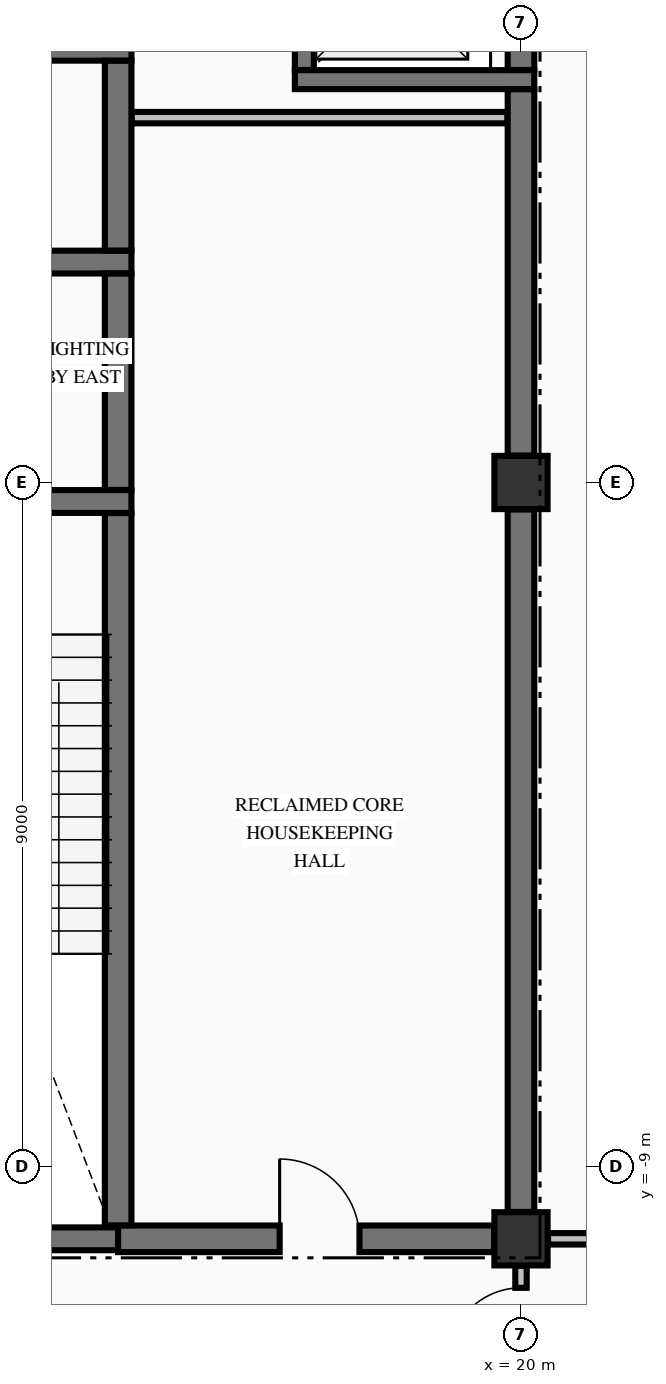
"""IFC4 building model, lengths in metres.
Left out: names, types, materials, properties, quantities, classifications, styles, units other than length and angle.
Written with IfcOpenShell. Run it as: python <this file> out.ifc"""

import sys

from ifc_helpers import new_model, si_unit, direction, frame, frame_2d, origin, origin_2d, place, context, subcontext, project, spatial, rectangle, extrude, element, fill, save


model = new_model("IFC4")
c1 = context("Model", 3, precision=1e-05, world=origin(), true_north=direction((0.0, 1.0)))
c2 = subcontext(c1, "Body", "Model", "MODEL_VIEW")
j1 = project(units=[si_unit("LENGTHUNIT", "METRE"), si_unit("PLANEANGLEUNIT", "RADIAN")], contexts=[c1])
p1 = place(None, origin())
s1 = spatial("IfcSite", under=j1, at=p1, CompositionType="ELEMENT")
p2 = place(p1, origin())
s2 = spatial("IfcBuilding", under=s1, at=p2, CompositionType="ELEMENT")
p3 = place(p2, frame((0.0, 0.0, 249.43)))
s3 = spatial("IfcBuildingStorey", under=s2, at=p3, CompositionType="ELEMENT", Elevation=249.43)
for number, where, z_axis, x_axis in (
    (1, (20.0, -9.95, -0.425), (0.0, 0.0, 1.0), (1.0, 0.0, 0.0)),
    (2, (20.0, 0.0, -0.425), (0.0, 0.0, 1.0), (1.0, 0.0, 0.0)),
):
    element("IfcColumn", number, at=place(p3, frame(where, z_axis=z_axis, x_axis=x_axis)), inside=s3, PredefinedType="COLUMN", context=c2, shape_type="SweptSolid", body=[
        extrude(rectangle(XDim=0.7, YDim=0.7, at=origin_2d()), origin(), (0.0, 0.0, 1.0), 5.0),
    ])
p4 = place(p3, frame((11.354, -9.95, 0.0), z_axis=(0.0, 0.0, 1.0), x_axis=(1.0, 0.0, 0.0)))
e3 = element("IfcWall", 3, at=p4, inside=s3, PredefinedType="SHEAR", context=c2, shape_type="SweptSolid", body=[
    extrude(rectangle(XDim=3.346, YDim=0.3, at=frame_2d((1.673, 0.0))), origin(), (0.0, 0.0, 1.0), 4.575),
])
p5 = place(p3, frame((14.7, -9.95, 0.0), z_axis=(0.0, 0.0, 1.0), x_axis=(1.0, 0.0, 0.0)))
e4 = element("IfcWall", 4, at=p5, inside=s3, PredefinedType="SHEAR", context=c2, shape_type="SweptSolid", body=[
    extrude(rectangle(XDim=4.946, YDim=0.35, at=frame_2d((2.473, 0.0))), origin(), (0.0, 0.0, 1.0), 4.575),
])
p6 = place(p5, frame((2.125, 0.0, 0.0)))
e5 = element("IfcOpeningElement", 5, at=p6, cuts=e4, PredefinedType="OPENING", context=c2, shape_type="SweptSolid", body=[
    extrude(rectangle(XDim=1.05, YDim=2.15, at=frame_2d((0.525, 1.075))), frame((0.0, 0.185, 0.0), z_axis=(0.0, -1.0, 0.0), x_axis=(1.0, 0.0, 0.0)), (0.0, 0.0, 1.0), 0.37),
])
p7 = place(p3, frame((11.354, -0.25, 0.0), z_axis=(0.0, 0.0, 1.0), x_axis=(1.0, 0.0, 0.0)))
e6 = element("IfcWall", 6, at=p7, inside=s3, PredefinedType="SHEAR", context=c2, shape_type="SweptSolid", body=[
    extrude(rectangle(XDim=3.521, YDim=0.3, at=frame_2d((1.76, 0.0))), origin(), (0.0, 0.0, 1.0), 4.575),
])
p8 = place(p7, frame((1.246, 0.0, 0.0)))
e7 = element("IfcOpeningElement", 7, at=p8, cuts=e6, PredefinedType="OPENING", context=c2, shape_type="SweptSolid", body=[
    extrude(rectangle(XDim=1.1, YDim=2.15, at=frame_2d((0.55, 1.075))), frame((0.0, 0.16, 0.0), z_axis=(0.0, -1.0, 0.0), x_axis=(1.0, 0.0, 0.0)), (0.0, 0.0, 1.0), 0.32),
])
p9 = place(p3, frame((10.85, 2.9, 0.0), z_axis=(0.0, 0.0, 1.0), x_axis=(1.0, 0.0, 0.0)))
e8 = element("IfcWall", 8, at=p9, inside=s3, PredefinedType="SHEAR", context=c2, shape_type="SweptSolid", body=[
    extrude(rectangle(XDim=4.025, YDim=0.3, at=frame_2d((2.012, 0.0))), origin(), (0.0, 0.0, 1.0), 4.575),
])
p10 = place(p9, frame((0.85, 0.0, 0.0)))
e9 = element("IfcOpeningElement", 9, at=p10, cuts=e8, PredefinedType="OPENING", context=c2, shape_type="SweptSolid", body=[
    extrude(rectangle(XDim=1.1, YDim=2.2, at=frame_2d((0.55, 1.1))), frame((0.0, 0.16, 0.0), z_axis=(0.0, -1.0, 0.0), x_axis=(1.0, 0.0, 0.0)), (0.0, 0.0, 1.0), 0.32),
])
p11 = place(p3, frame((17.025, 5.3, 0.0), z_axis=(0.0, 0.0, 1.0), x_axis=(1.0, 0.0, 0.0)))
e10 = element("IfcWall", 10, at=p11, inside=s3, PredefinedType="SOLIDWALL", context=c2, shape_type="SweptSolid", body=[
    extrude(rectangle(XDim=3.15, YDim=0.25, at=frame_2d((1.575, 0.0))), origin(), (0.0, 0.0, 1.0), 4.575),
])
p12 = place(p3, frame((10.85, 5.7, 0.0), z_axis=(0.0, 0.0, 1.0), x_axis=(1.0, 0.0, 0.0)))
e11 = element("IfcWall", 11, at=p12, inside=s3, PredefinedType="SHEAR", context=c2, shape_type="SweptSolid", body=[
    extrude(rectangle(XDim=4.025, YDim=0.3, at=frame_2d((2.012, 0.0))), origin(), (0.0, 0.0, 1.0), 4.575),
])
p13 = place(p3, frame((20.356, -9.95, 0.0), z_axis=(0.0, 0.0, 1.0), x_axis=(1.0, 0.0, 0.0)))
e12 = element("IfcWall", 12, at=p13, inside=s3, PredefinedType="PARTITIONING", context=c2, shape_type="SweptSolid", body=[
    extrude(rectangle(XDim=5.479, YDim=0.15, at=frame_2d((2.74, 0.0))), origin(), (0.0, 0.0, 1.0), 4.575),
])
p14 = place(p13, frame((2.144, 0.0, 0.0)))
e13 = element("IfcOpeningElement", 13, at=p14, cuts=e12, PredefinedType="OPENING", context=c2, shape_type="SweptSolid", body=[
    extrude(rectangle(XDim=1.0, YDim=2.15, at=frame_2d((0.5, 1.075))), frame((0.0, 0.085, 0.0), z_axis=(0.0, -1.0, 0.0), x_axis=(1.0, 0.0, 0.0)), (0.0, 0.0, 1.0), 0.17),
])
p15 = place(p3, frame((14.878, 4.8, 0.0), z_axis=(0.0, 0.0, 1.0), x_axis=(1.0, 0.0, 0.0)))
e14 = element("IfcWall", 14, at=p15, inside=s3, PredefinedType="PARTITIONING", context=c2, shape_type="SweptSolid", body=[
    extrude(rectangle(XDim=4.944, YDim=0.15, at=frame_2d((2.472, 0.0))), origin(), (0.0, 0.0, 1.0), 4.575),
])
p16 = place(p3, frame((14.7, -9.773, 0.0), z_axis=(0.0, 0.0, 1.0), x_axis=(0.0, 1.0, 0.0)))
e15 = element("IfcWall", 15, at=p16, inside=s3, PredefinedType="SHEAR", context=c2, shape_type="SweptSolid", body=[
    extrude(rectangle(XDim=9.371, YDim=0.35, at=frame_2d((4.686, 0.0))), origin(), (0.0, 0.0, 1.0), 4.575),
])
p17 = place(p3, frame((14.7, -0.098, 0.0), z_axis=(0.0, 0.0, 1.0), x_axis=(0.0, 1.0, 0.0)))
e16 = element("IfcWall", 16, at=p17, inside=s3, PredefinedType="SHEAR", context=c2, shape_type="SweptSolid", body=[
    extrude(rectangle(XDim=2.846, YDim=0.35, at=frame_2d((1.423, 0.0))), origin(), (0.0, 0.0, 1.0), 4.575),
])
p18 = place(p3, frame((14.7, 3.052, 0.0), z_axis=(0.0, 0.0, 1.0), x_axis=(0.0, 1.0, 0.0)))
e17 = element("IfcWall", 17, at=p18, inside=s3, PredefinedType="SHEAR", context=c2, shape_type="SweptSolid", body=[
    extrude(rectangle(XDim=2.496, YDim=0.35, at=frame_2d((1.248, 0.0))), origin(), (0.0, 0.0, 1.0), 4.575),
])
p19 = place(p3, frame((17.15, 5.427, 0.0), z_axis=(0.0, 0.0, 1.0), x_axis=(0.0, 1.0, 0.0)))
e18 = element("IfcWall", 18, at=p19, inside=s3, PredefinedType="SOLIDWALL", context=c2, shape_type="SweptSolid", body=[
    extrude(rectangle(XDim=2.196, YDim=0.25, at=frame_2d((1.098, 0.0))), origin(), (0.0, 0.0, 1.0), 4.575),
])
p20 = place(p19, frame((0.548, 0.0, 0.0)))
e19 = element("IfcOpeningElement", 19, at=p20, cuts=e18, PredefinedType="OPENING", context=c2, shape_type="SweptSolid", body=[
    extrude(rectangle(XDim=1.1, YDim=2.2, at=frame_2d((0.55, 1.1))), frame((0.0, 0.135, 0.0), z_axis=(0.0, -1.0, 0.0), x_axis=(1.0, 0.0, 0.0)), (0.0, 0.0, 1.0), 0.27),
])
p21 = place(p3, frame((20.0, -9.596, 0.0), z_axis=(0.0, 0.0, 1.0), x_axis=(0.0, 1.0, 0.0)))
e20 = element("IfcWall", 20, at=p21, inside=s3, PredefinedType="SHEAR", context=c2, shape_type="SweptSolid", body=[
    extrude(rectangle(XDim=9.242, YDim=0.35, at=frame_2d((4.621, 0.0))), origin(), (0.0, 0.0, 1.0), 4.575),
])
p22 = place(p3, frame((20.0, 0.354, 0.0), z_axis=(0.0, 0.0, 1.0), x_axis=(0.0, 1.0, 0.0)))
e21 = element("IfcWall", 21, at=p22, inside=s3, PredefinedType="SHEAR", context=c2, shape_type="SweptSolid", body=[
    extrude(rectangle(XDim=4.819, YDim=0.35, at=frame_2d((2.41, 0.0))), origin(), (0.0, 0.0, 1.0), 4.575),
])
p23 = place(p3, frame((20.0, 5.427, 0.0), z_axis=(0.0, 0.0, 1.0), x_axis=(0.0, 1.0, 0.0)))
e22 = element("IfcWall", 22, at=p23, inside=s3, PredefinedType="SHEAR", context=c2, shape_type="SweptSolid", body=[
    extrude(rectangle(XDim=2.196, YDim=0.35, at=frame_2d((1.098, 0.0))), origin(), (0.0, 0.0, 1.0), 4.575),
])
p24 = place(p3, frame((20.0, -12.122, 0.0), z_axis=(0.0, 0.0, 1.0), x_axis=(0.0, 1.0, 0.0)))
e23 = element("IfcWall", 23, at=p24, inside=s3, PredefinedType="PARTITIONING", context=c2, shape_type="SweptSolid", body=[
    extrude(rectangle(XDim=1.816, YDim=0.15, at=frame_2d((0.908, 0.0))), origin(), (0.0, 0.0, 1.0), 4.575),
])
p25 = place(p24, frame((0.577, 0.0, 0.0)))
e24 = element("IfcOpeningElement", 24, at=p25, cuts=e23, PredefinedType="OPENING", context=c2, shape_type="SweptSolid", body=[
    extrude(rectangle(XDim=0.95, YDim=2.02, at=frame_2d((0.475, 1.01))), frame((0.0, 0.085, 0.0), z_axis=(0.0, -1.0, 0.0), x_axis=(1.0, 0.0, 0.0)), (0.0, 0.0, 1.0), 0.17),
])
p26 = place(p6, origin())
e25 = element("IfcDoor", 25, at=p26, inside=s3, OperationType="SINGLE_SWING_LEFT", PredefinedType="DOOR", context=c2, shape_type="SweptSolid", body=[
    extrude(rectangle(XDim=1.05, YDim=2.15, at=frame_2d((0.525, 1.075))), frame((0.0, 0.025, 0.0), z_axis=(0.0, -1.0, 0.0), x_axis=(1.0, 0.0, 0.0)), (0.0, 0.0, 1.0), 0.05),
])
fill(e5, e25)
p27 = place(p25, origin())
e26 = element("IfcDoor", 26, at=p27, inside=s3, OperationType="SINGLE_SWING_LEFT", PredefinedType="DOOR", context=c2, shape_type="SweptSolid", body=[
    extrude(rectangle(XDim=0.95, YDim=2.02, at=frame_2d((0.475, 1.01))), frame((0.0, 0.025, 0.0), z_axis=(0.0, -1.0, 0.0), x_axis=(1.0, 0.0, 0.0)), (0.0, 0.0, 1.0), 0.05),
])
fill(e24, e26)
save(model, sys.argv[1])
